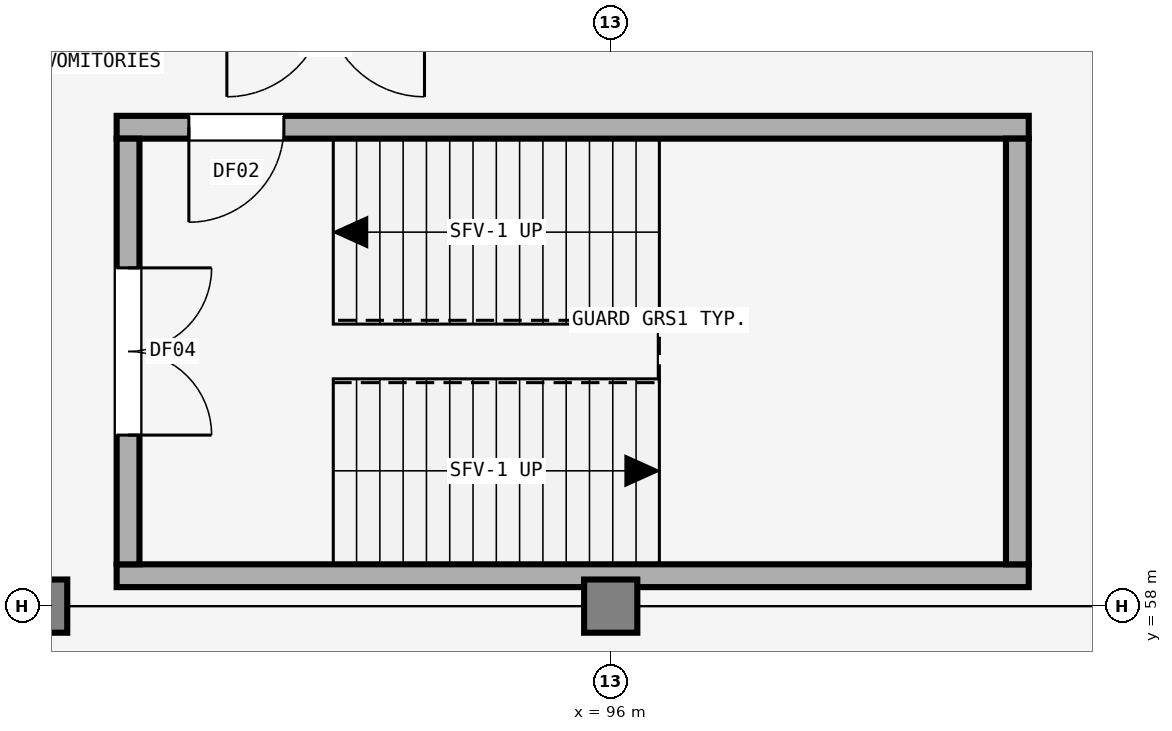
"""IFC4 building model, lengths in metres.
Left out: names, types, materials, properties, quantities, classifications, styles, units other than length and angle.
Written with IfcOpenShell. Run it as: python <this file> out.ifc"""

import sys

from ifc_helpers import new_model, si_unit, direction, frame, frame_2d, origin, origin_2d, place, context, subcontext, project, spatial, rectangle, extrude, element, fill, save


model = new_model("IFC4")
c1 = context("Model", 3, precision=1e-05, world=origin(), true_north=direction((0.0, 1.0)))
c2 = subcontext(c1, "Body", "Model", "MODEL_VIEW")
j1 = project(units=[si_unit("LENGTHUNIT", "METRE"), si_unit("PLANEANGLEUNIT", "RADIAN")], contexts=[c1])
p1 = place(None, origin())
s1 = spatial("IfcSite", under=j1, at=p1, CompositionType="ELEMENT")
p2 = place(p1, origin())
s2 = spatial("IfcBuilding", under=s1, at=p2, CompositionType="ELEMENT")
p3 = place(p2, origin())
s3 = spatial("IfcBuildingStorey", under=s2, at=p3, CompositionType="ELEMENT", Elevation=0.0)
for number, where, z_axis, x_axis in (
    (1, (88.5, 58.0, 0.0), (0.0, 0.0, 1.0), (1.0, 0.0, 0.0)),
    (2, (96.0, 58.0, 0.0), (0.0, 0.0, 1.0), (1.0, 0.0, 0.0)),
):
    element("IfcColumn", number, at=place(p3, frame(where, z_axis=z_axis, x_axis=x_axis)), inside=s3, PredefinedType="COLUMN", context=c2, shape_type="SweptSolid", body=[
        extrude(rectangle(XDim=0.7, YDim=0.7, at=origin_2d()), origin(), (0.0, 0.0, 1.0), 4.8),
    ])
p4 = place(p3, frame((89.5, 58.4, 0.0), z_axis=(0.0, 0.0, 1.0), x_axis=(1.0, 0.0, 0.0)))
e3 = element("IfcWall", 3, at=p4, inside=s3, PredefinedType="SHEAR", context=c2, shape_type="SweptSolid", body=[
    extrude(rectangle(XDim=12.0, YDim=0.3, at=frame_2d((6.0, 0.0))), origin(), (0.0, 0.0, 1.0), 4.8),
])
p5 = place(p3, frame((101.5, 64.3, 0.0), z_axis=(0.0, 0.0, 1.0), x_axis=(-1.0, 0.0, 0.0)))
e4 = element("IfcWall", 4, at=p5, inside=s3, PredefinedType="SHEAR", context=c2, shape_type="SweptSolid", body=[
    extrude(rectangle(XDim=12.0, YDim=0.3, at=frame_2d((6.0, 0.0))), origin(), (0.0, 0.0, 1.0), 4.8),
])
p6 = place(p5, frame((9.8, 0.0, 0.0)))
e5 = element("IfcOpeningElement", 5, at=p6, cuts=e4, PredefinedType="OPENING", context=c2, shape_type="SweptSolid", body=[
    extrude(rectangle(XDim=1.25, YDim=2.15, at=frame_2d((0.625, 1.075))), frame((0.0, 0.16, 0.0), z_axis=(0.0, -1.0, 0.0), x_axis=(1.0, 0.0, 0.0)), (0.0, 0.0, 1.0), 0.32),
])
p7 = place(p3, frame((89.65, 64.15, 0.0), z_axis=(0.0, 0.0, 1.0), x_axis=(0.0, -1.0, 0.0)))
e6 = element("IfcWall", 6, at=p7, inside=s3, PredefinedType="SHEAR", context=c2, shape_type="SweptSolid", body=[
    extrude(rectangle(XDim=5.6, YDim=0.3, at=frame_2d((2.8, 0.0))), origin(), (0.0, 0.0, 1.0), 4.8),
])
p8 = place(p7, frame((1.7, 0.0, 0.0)))
e7 = element("IfcOpeningElement", 7, at=p8, cuts=e6, PredefinedType="OPENING", context=c2, shape_type="SweptSolid", body=[
    extrude(rectangle(XDim=2.2, YDim=2.25, at=frame_2d((1.1, 1.125))), frame((0.0, 0.16, 0.0), z_axis=(0.0, -1.0, 0.0), x_axis=(1.0, 0.0, 0.0)), (0.0, 0.0, 1.0), 0.32),
])
p9 = place(p3, frame((101.35, 58.55, 0.0), z_axis=(0.0, 0.0, 1.0), x_axis=(0.0, 1.0, 0.0)))
e8 = element("IfcWall", 8, at=p9, inside=s3, PredefinedType="SHEAR", context=c2, shape_type="SweptSolid", body=[
    extrude(rectangle(XDim=5.6, YDim=0.3, at=frame_2d((2.8, 0.0))), origin(), (0.0, 0.0, 1.0), 4.8),
])
p10 = place(p8, origin())
e9 = element("IfcDoor", 9, at=p10, inside=s3, OperationType="DOUBLE_DOOR_SINGLE_SWING", PredefinedType="DOOR", context=c2, shape_type="SweptSolid", body=[
    extrude(rectangle(XDim=2.2, YDim=2.25, at=frame_2d((1.1, 1.125))), frame((0.0, 0.025, 0.0), z_axis=(0.0, -1.0, 0.0), x_axis=(1.0, 0.0, 0.0)), (0.0, 0.0, 1.0), 0.05),
])
fill(e7, e9)
p11 = place(p6, origin())
e10 = element("IfcDoor", 10, at=p11, inside=s3, OperationType="SINGLE_SWING_RIGHT", PredefinedType="DOOR", context=c2, shape_type="SweptSolid", body=[
    extrude(rectangle(XDim=1.25, YDim=2.15, at=frame_2d((0.625, 1.075))), frame((0.0, 0.025, 0.0), z_axis=(0.0, -1.0, 0.0), x_axis=(1.0, 0.0, 0.0)), (0.0, 0.0, 1.0), 0.05),
])
fill(e5, e10)
save(model, sys.argv[1])
